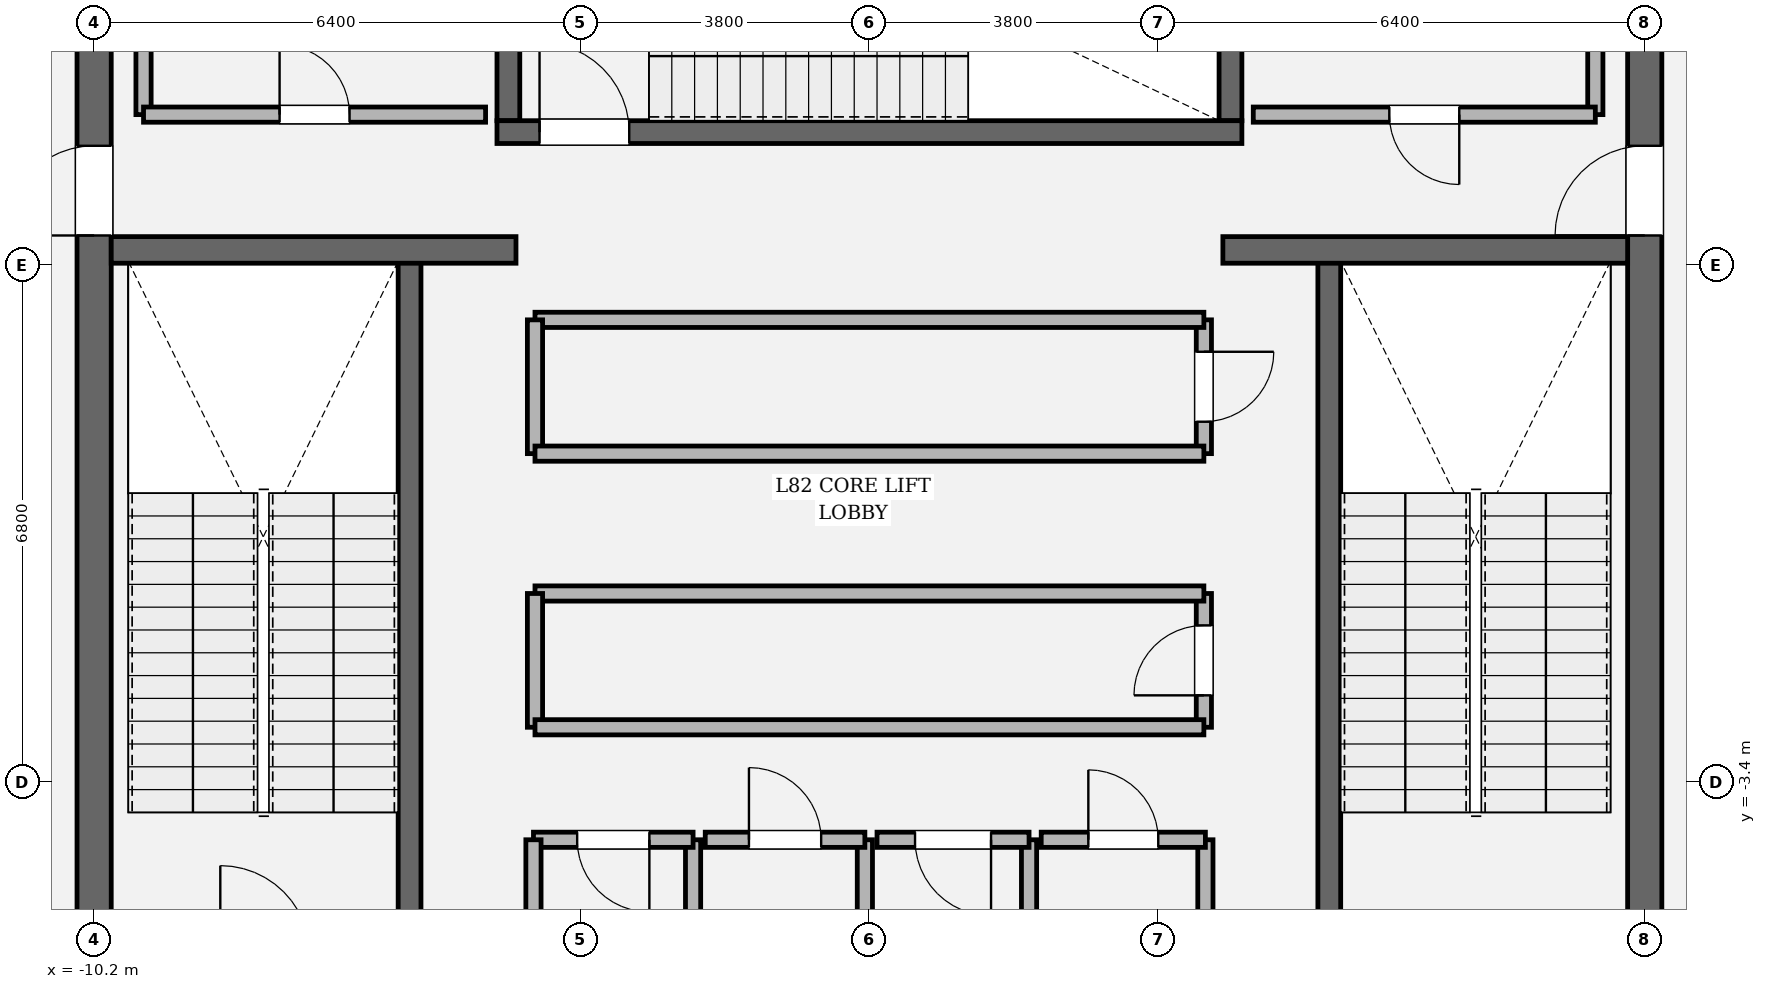
"""IFC4 building model, lengths in metres.
Left out: names, types, materials, properties, quantities, classifications, styles, units other than length and angle.
Written with IfcOpenShell. Run it as: python <this file> out.ifc"""

import sys

from ifc_helpers import new_model, si_unit, direction, frame, frame_2d, origin, place, context, subcontext, project, spatial, rectangle, extrude, element, fill, save


model = new_model("IFC4")
c1 = context("Model", 3, precision=1e-05, world=origin(), true_north=direction((0.0, 1.0)))
c2 = subcontext(c1, "Body", "Model", "MODEL_VIEW")
j1 = project(units=[si_unit("LENGTHUNIT", "METRE"), si_unit("PLANEANGLEUNIT", "RADIAN")], contexts=[c1])
p1 = place(None, origin())
s1 = spatial("IfcSite", under=j1, at=p1, CompositionType="ELEMENT")
p2 = place(p1, origin())
s2 = spatial("IfcBuilding", under=s1, at=p2, CompositionType="ELEMENT")
p3 = place(p2, frame((0.0, 0.0, 348.3)))
s3 = spatial("IfcBuildingStorey", under=s2, at=p3, CompositionType="ELEMENT", Elevation=348.3)
p4 = place(p3, frame((-10.2, -8.975, 0.0), z_axis=(0.0, 0.0, 1.0), x_axis=(0.0, 1.0, 0.0)))
e1 = element("IfcWall", 1, at=p4, inside=s3, PredefinedType="SHEAR", context=c2, shape_type="SweptSolid", body=[
    extrude(rectangle(XDim=17.95, YDim=0.45, at=frame_2d((8.975, 0.0))), origin(), (0.0, 0.0, 1.0), 4.5),
])
p5 = place(p4, frame((12.765, 0.0, 0.0)))
e2 = element("IfcOpeningElement", 2, at=p5, cuts=e1, PredefinedType="OPENING", context=c2, shape_type="SweptSolid", body=[
    extrude(rectangle(XDim=1.18, YDim=2.2, at=frame_2d((0.59, 1.1))), frame((0.0, 0.235, 0.0), z_axis=(0.0, -1.0, 0.0), x_axis=(1.0, 0.0, 0.0)), (0.0, 0.0, 1.0), 0.47),
])
p6 = place(p3, frame((10.2, 8.975, 0.0), z_axis=(0.0, 0.0, 1.0), x_axis=(0.0, -1.0, 0.0)))
e3 = element("IfcWall", 3, at=p6, inside=s3, PredefinedType="SHEAR", context=c2, shape_type="SweptSolid", body=[
    extrude(rectangle(XDim=17.95, YDim=0.45, at=frame_2d((8.975, 0.0))), origin(), (0.0, 0.0, 1.0), 4.5),
])
p7 = place(p6, frame((4.005, 0.0, 0.0)))
e4 = element("IfcOpeningElement", 4, at=p7, cuts=e3, PredefinedType="OPENING", context=c2, shape_type="SweptSolid", body=[
    extrude(rectangle(XDim=1.18, YDim=2.2, at=frame_2d((0.59, 1.1))), frame((0.0, 0.235, 0.0), z_axis=(0.0, -1.0, 0.0), x_axis=(1.0, 0.0, 0.0)), (0.0, 0.0, 1.0), 0.47),
])
for number, where, z_axis, x_axis in (
    (5, (-6.05, -5.5, 0.0), (0.0, 0.0, 1.0), (0.0, 1.0, 0.0)),
    (6, (6.05, 3.45, 0.0), (0.0, 0.0, 1.0), (0.0, -1.0, 0.0)),
):
    element("IfcWall", number, at=place(p3, frame(where, z_axis=z_axis, x_axis=x_axis)), inside=s3, PredefinedType="SOLIDWALL", context=c2, shape_type="SweptSolid", body=[
        extrude(rectangle(XDim=8.95, YDim=0.3, at=frame_2d((4.475, 0.0))), origin(), (0.0, 0.0, 1.0), 4.5),
    ])
for number, where, z_axis, x_axis in (
    (7, (-4.75, 5.3, 0.0), (0.0, 0.0, 1.0), (0.0, 1.0, 0.0)),
    (8, (4.75, 8.975, 0.0), (0.0, 0.0, 1.0), (0.0, -1.0, 0.0)),
):
    element("IfcWall", number, at=place(p3, frame(where, z_axis=z_axis, x_axis=x_axis)), inside=s3, PredefinedType="SOLIDWALL", context=c2, shape_type="SweptSolid", body=[
        extrude(rectangle(XDim=3.675, YDim=0.3, at=frame_2d((1.837, 0.0))), origin(), (0.0, 0.0, 1.0), 4.5),
    ])
p8 = place(p3, frame((-4.9, 5.15, 0.0), z_axis=(0.0, 0.0, 1.0), x_axis=(1.0, 0.0, 0.0)))
e9 = element("IfcWall", 9, at=p8, inside=s3, PredefinedType="SOLIDWALL", context=c2, shape_type="SweptSolid", body=[
    extrude(rectangle(XDim=9.8, YDim=0.3, at=frame_2d((4.9, 0.0))), origin(), (0.0, 0.0, 1.0), 4.5),
])
p9 = place(p8, frame((0.56, 0.0, 0.0)))
e10 = element("IfcOpeningElement", 10, at=p9, cuts=e9, PredefinedType="OPENING", context=c2, shape_type="SweptSolid", body=[
    extrude(rectangle(XDim=1.18, YDim=2.2, at=frame_2d((0.59, 1.1))), frame((0.0, 0.16, 0.0), z_axis=(0.0, -1.0, 0.0), x_axis=(1.0, 0.0, 0.0)), (0.0, 0.0, 1.0), 0.32),
])
for number, where, z_axis, x_axis in (
    (11, (-9.975, 3.6, 0.0), (0.0, 0.0, 1.0), (1.0, 0.0, 0.0)),
    (12, (4.65, 3.6, 0.0), (0.0, 0.0, 1.0), (1.0, 0.0, 0.0)),
):
    element("IfcWall", number, at=place(p3, frame(where, z_axis=z_axis, x_axis=x_axis)), inside=s3, PredefinedType="SOLIDWALL", context=c2, shape_type="SweptSolid", body=[
        extrude(rectangle(XDim=5.325, YDim=0.35, at=frame_2d((2.663, 0.0))), origin(), (0.0, 0.0, 1.0), 4.5),
    ])
p10 = place(p3, frame((-2.32, -5.9, 0.0), z_axis=(0.0, 0.0, 1.0), x_axis=(0.0, 1.0, 0.0)))
e13 = element("IfcWall", 13, at=p10, inside=s3, PredefinedType="SOLIDWALL", context=c2, shape_type="SweptSolid", body=[
    extrude(rectangle(XDim=1.74, YDim=0.2, at=frame_2d((0.87, 0.0))), origin(), (0.0, 0.0, 1.0), 4.22),
])
p11 = place(p3, frame((-2.32, -4.16, 0.0), z_axis=(0.0, 0.0, 1.0), x_axis=(-1.0, 0.0, 0.0)))
e14 = element("IfcWall", 14, at=p11, inside=s3, PredefinedType="SOLIDWALL", context=c2, shape_type="SweptSolid", body=[
    extrude(rectangle(XDim=2.1, YDim=0.2, at=frame_2d((1.05, 0.0))), origin(), (0.0, 0.0, 1.0), 4.22),
])
p12 = place(p11, frame((0.575, 0.0, 0.0)))
e15 = element("IfcOpeningElement", 15, at=p12, cuts=e14, PredefinedType="OPENING", context=c2, shape_type="SweptSolid", body=[
    extrude(rectangle(XDim=0.95, YDim=2.15, at=frame_2d((0.475, 1.075))), frame((0.0, 0.11, 0.0), z_axis=(0.0, -1.0, 0.0), x_axis=(1.0, 0.0, 0.0)), (0.0, 0.0, 1.0), 0.22),
])
for number, where, z_axis, x_axis in (
    (16, (-4.42, -4.16, 0.0), (0.0, 0.0, 1.0), (0.0, -1.0, 0.0)),
    (17, (-0.06, -5.9, 0.0), (0.0, 0.0, 1.0), (0.0, 1.0, 0.0)),
):
    element("IfcWall", number, at=place(p3, frame(where, z_axis=z_axis, x_axis=x_axis)), inside=s3, PredefinedType="SOLIDWALL", context=c2, shape_type="SweptSolid", body=[
        extrude(rectangle(XDim=1.74, YDim=0.2, at=frame_2d((0.87, 0.0))), origin(), (0.0, 0.0, 1.0), 4.22),
    ])
p13 = place(p3, frame((-0.06, -4.16, 0.0), z_axis=(0.0, 0.0, 1.0), x_axis=(-1.0, 0.0, 0.0)))
e18 = element("IfcWall", 18, at=p13, inside=s3, PredefinedType="SOLIDWALL", context=c2, shape_type="SweptSolid", body=[
    extrude(rectangle(XDim=2.1, YDim=0.2, at=frame_2d((1.05, 0.0))), origin(), (0.0, 0.0, 1.0), 4.22),
])
p14 = place(p13, frame((0.575, 0.0, 0.0)))
e19 = element("IfcOpeningElement", 19, at=p14, cuts=e18, PredefinedType="OPENING", context=c2, shape_type="SweptSolid", body=[
    extrude(rectangle(XDim=0.95, YDim=2.15, at=frame_2d((0.475, 1.075))), frame((0.0, 0.11, 0.0), z_axis=(0.0, -1.0, 0.0), x_axis=(1.0, 0.0, 0.0)), (0.0, 0.0, 1.0), 0.22),
])
p15 = place(p3, frame((2.1, -5.9, 0.0), z_axis=(0.0, 0.0, 1.0), x_axis=(0.0, 1.0, 0.0)))
e20 = element("IfcWall", 20, at=p15, inside=s3, PredefinedType="SOLIDWALL", context=c2, shape_type="SweptSolid", body=[
    extrude(rectangle(XDim=1.74, YDim=0.2, at=frame_2d((0.87, 0.0))), origin(), (0.0, 0.0, 1.0), 4.22),
])
p16 = place(p3, frame((2.1, -4.16, 0.0), z_axis=(0.0, 0.0, 1.0), x_axis=(-1.0, 0.0, 0.0)))
e21 = element("IfcWall", 21, at=p16, inside=s3, PredefinedType="SOLIDWALL", context=c2, shape_type="SweptSolid", body=[
    extrude(rectangle(XDim=2.0, YDim=0.2, at=frame_2d((1.0, 0.0))), origin(), (0.0, 0.0, 1.0), 4.22),
])
p17 = place(p16, frame((0.5, 0.0, 0.0)))
e22 = element("IfcOpeningElement", 22, at=p17, cuts=e21, PredefinedType="OPENING", context=c2, shape_type="SweptSolid", body=[
    extrude(rectangle(XDim=1.0, YDim=2.15, at=frame_2d((0.5, 1.075))), frame((0.0, 0.11, 0.0), z_axis=(0.0, -1.0, 0.0), x_axis=(1.0, 0.0, 0.0)), (0.0, 0.0, 1.0), 0.22),
])
p18 = place(p3, frame((4.42, -5.9, 0.0), z_axis=(0.0, 0.0, 1.0), x_axis=(0.0, 1.0, 0.0)))
e23 = element("IfcWall", 23, at=p18, inside=s3, PredefinedType="SOLIDWALL", context=c2, shape_type="SweptSolid", body=[
    extrude(rectangle(XDim=1.74, YDim=0.2, at=frame_2d((0.87, 0.0))), origin(), (0.0, 0.0, 1.0), 4.22),
])
p19 = place(p3, frame((4.42, -4.16, 0.0), z_axis=(0.0, 0.0, 1.0), x_axis=(-1.0, 0.0, 0.0)))
e24 = element("IfcWall", 24, at=p19, inside=s3, PredefinedType="SOLIDWALL", context=c2, shape_type="SweptSolid", body=[
    extrude(rectangle(XDim=2.16, YDim=0.2, at=frame_2d((1.08, 0.0))), origin(), (0.0, 0.0, 1.0), 4.22),
])
p20 = place(p19, frame((0.62, 0.0, 0.0)))
e25 = element("IfcOpeningElement", 25, at=p20, cuts=e24, PredefinedType="OPENING", context=c2, shape_type="SweptSolid", body=[
    extrude(rectangle(XDim=0.92, YDim=2.1, at=frame_2d((0.46, 1.05))), frame((0.0, 0.11, 0.0), z_axis=(0.0, -1.0, 0.0), x_axis=(1.0, 0.0, 0.0)), (0.0, 0.0, 1.0), 0.22),
])
p21 = place(p3, frame((4.4, -2.68, 0.0), z_axis=(0.0, 0.0, 1.0), x_axis=(0.0, 1.0, 0.0)))
e26 = element("IfcWall", 26, at=p21, inside=s3, PredefinedType="SOLIDWALL", context=c2, shape_type="SweptSolid", body=[
    extrude(rectangle(XDim=1.76, YDim=0.2, at=frame_2d((0.88, 0.0))), origin(), (0.0, 0.0, 1.0), 4.22),
])
p22 = place(p21, frame((0.42, 0.0, 0.0)))
e27 = element("IfcOpeningElement", 27, at=p22, cuts=e26, PredefinedType="OPENING", context=c2, shape_type="SweptSolid", body=[
    extrude(rectangle(XDim=0.92, YDim=2.1, at=frame_2d((0.46, 1.05))), frame((0.0, 0.11, 0.0), z_axis=(0.0, -1.0, 0.0), x_axis=(1.0, 0.0, 0.0)), (0.0, 0.0, 1.0), 0.22),
])
p23 = place(p3, frame((4.4, -0.92, 0.0), z_axis=(0.0, 0.0, 1.0), x_axis=(-1.0, 0.0, 0.0)))
e28 = element("IfcWall", 28, at=p23, inside=s3, PredefinedType="SOLIDWALL", context=c2, shape_type="SweptSolid", body=[
    extrude(rectangle(XDim=8.8, YDim=0.2, at=frame_2d((4.4, 0.0))), origin(), (0.0, 0.0, 1.0), 4.22),
])
p24 = place(p3, frame((-4.4, -0.92, 0.0), z_axis=(0.0, 0.0, 1.0), x_axis=(0.0, -1.0, 0.0)))
e29 = element("IfcWall", 29, at=p24, inside=s3, PredefinedType="SOLIDWALL", context=c2, shape_type="SweptSolid", body=[
    extrude(rectangle(XDim=1.76, YDim=0.2, at=frame_2d((0.88, 0.0))), origin(), (0.0, 0.0, 1.0), 4.22),
])
p25 = place(p3, frame((-4.4, -2.68, 0.0), z_axis=(0.0, 0.0, 1.0), x_axis=(1.0, 0.0, 0.0)))
e30 = element("IfcWall", 30, at=p25, inside=s3, PredefinedType="SOLIDWALL", context=c2, shape_type="SweptSolid", body=[
    extrude(rectangle(XDim=8.8, YDim=0.2, at=frame_2d((4.4, 0.0))), origin(), (0.0, 0.0, 1.0), 4.22),
])
p26 = place(p3, frame((4.4, 0.92, 0.0), z_axis=(0.0, 0.0, 1.0), x_axis=(0.0, 1.0, 0.0)))
e31 = element("IfcWall", 31, at=p26, inside=s3, PredefinedType="SOLIDWALL", context=c2, shape_type="SweptSolid", body=[
    extrude(rectangle(XDim=1.76, YDim=0.2, at=frame_2d((0.88, 0.0))), origin(), (0.0, 0.0, 1.0), 4.22),
])
p27 = place(p26, frame((0.42, 0.0, 0.0)))
e32 = element("IfcOpeningElement", 32, at=p27, cuts=e31, PredefinedType="OPENING", context=c2, shape_type="SweptSolid", body=[
    extrude(rectangle(XDim=0.92, YDim=2.1, at=frame_2d((0.46, 1.05))), frame((0.0, 0.11, 0.0), z_axis=(0.0, -1.0, 0.0), x_axis=(1.0, 0.0, 0.0)), (0.0, 0.0, 1.0), 0.22),
])
p28 = place(p3, frame((4.4, 2.68, 0.0), z_axis=(0.0, 0.0, 1.0), x_axis=(-1.0, 0.0, 0.0)))
e33 = element("IfcWall", 33, at=p28, inside=s3, PredefinedType="SOLIDWALL", context=c2, shape_type="SweptSolid", body=[
    extrude(rectangle(XDim=8.8, YDim=0.2, at=frame_2d((4.4, 0.0))), origin(), (0.0, 0.0, 1.0), 4.22),
])
p29 = place(p3, frame((-4.4, 2.68, 0.0), z_axis=(0.0, 0.0, 1.0), x_axis=(0.0, -1.0, 0.0)))
e34 = element("IfcWall", 34, at=p29, inside=s3, PredefinedType="SOLIDWALL", context=c2, shape_type="SweptSolid", body=[
    extrude(rectangle(XDim=1.76, YDim=0.2, at=frame_2d((0.88, 0.0))), origin(), (0.0, 0.0, 1.0), 4.22),
])
p30 = place(p3, frame((-4.4, 0.92, 0.0), z_axis=(0.0, 0.0, 1.0), x_axis=(1.0, 0.0, 0.0)))
e35 = element("IfcWall", 35, at=p30, inside=s3, PredefinedType="SOLIDWALL", context=c2, shape_type="SweptSolid", body=[
    extrude(rectangle(XDim=8.8, YDim=0.2, at=frame_2d((4.4, 0.0))), origin(), (0.0, 0.0, 1.0), 4.22),
])
p31 = place(p3, frame((-9.55, 8.65, 0.0), z_axis=(0.0, 0.0, 1.0), x_axis=(0.0, -1.0, 0.0)))
e36 = element("IfcWall", 36, at=p31, inside=s3, PredefinedType="SOLIDWALL", context=c2, shape_type="SweptSolid", body=[
    extrude(rectangle(XDim=3.27, YDim=0.2, at=frame_2d((1.635, 0.0))), origin(), (0.0, 0.0, 1.0), 4.22),
])
p32 = place(p3, frame((-9.55, 5.38, 0.0), z_axis=(0.0, 0.0, 1.0), x_axis=(1.0, 0.0, 0.0)))
e37 = element("IfcWall", 37, at=p32, inside=s3, PredefinedType="SOLIDWALL", context=c2, shape_type="SweptSolid", body=[
    extrude(rectangle(XDim=4.5, YDim=0.2, at=frame_2d((2.25, 0.0))), origin(), (0.0, 0.0, 1.0), 4.22),
])
p33 = place(p32, frame((1.79, 0.0, 0.0)))
e38 = element("IfcOpeningElement", 38, at=p33, cuts=e37, PredefinedType="OPENING", context=c2, shape_type="SweptSolid", body=[
    extrude(rectangle(XDim=0.92, YDim=2.1, at=frame_2d((0.46, 1.05))), frame((0.0, 0.11, 0.0), z_axis=(0.0, -1.0, 0.0), x_axis=(1.0, 0.0, 0.0)), (0.0, 0.0, 1.0), 0.22),
])
p34 = place(p3, frame((9.55, 5.38, 0.0), z_axis=(0.0, 0.0, 1.0), x_axis=(0.0, 1.0, 0.0)))
e39 = element("IfcWall", 39, at=p34, inside=s3, PredefinedType="SOLIDWALL", context=c2, shape_type="SweptSolid", body=[
    extrude(rectangle(XDim=3.27, YDim=0.2, at=frame_2d((1.635, 0.0))), origin(), (0.0, 0.0, 1.0), 4.22),
])
p35 = place(p3, frame((5.05, 5.38, 0.0), z_axis=(0.0, 0.0, 1.0), x_axis=(1.0, 0.0, 0.0)))
e40 = element("IfcWall", 40, at=p35, inside=s3, PredefinedType="SOLIDWALL", context=c2, shape_type="SweptSolid", body=[
    extrude(rectangle(XDim=4.5, YDim=0.2, at=frame_2d((2.25, 0.0))), origin(), (0.0, 0.0, 1.0), 4.22),
])
p36 = place(p35, frame((1.79, 0.0, 0.0)))
e41 = element("IfcOpeningElement", 41, at=p36, cuts=e40, PredefinedType="OPENING", context=c2, shape_type="SweptSolid", body=[
    extrude(rectangle(XDim=0.92, YDim=2.1, at=frame_2d((0.46, 1.05))), frame((0.0, 0.11, 0.0), z_axis=(0.0, -1.0, 0.0), x_axis=(1.0, 0.0, 0.0)), (0.0, 0.0, 1.0), 0.22),
])
p37 = place(p9, origin())
e42 = element("IfcDoor", 42, at=p37, inside=s3, OperationType="SINGLE_SWING_LEFT", PredefinedType="DOOR", context=c2, shape_type="SweptSolid", body=[
    extrude(rectangle(XDim=1.18, YDim=2.2, at=frame_2d((0.59, 1.1))), frame((0.0, 0.025, 0.0), z_axis=(0.0, -1.0, 0.0), x_axis=(1.0, 0.0, 0.0)), (0.0, 0.0, 1.0), 0.05),
])
fill(e10, e42)
p38 = place(p5, origin())
e43 = element("IfcDoor", 43, at=p38, inside=s3, OperationType="SINGLE_SWING_LEFT", PredefinedType="DOOR", context=c2, shape_type="SweptSolid", body=[
    extrude(rectangle(XDim=1.18, YDim=2.2, at=frame_2d((0.59, 1.1))), frame((0.0, 0.025, 0.0), z_axis=(0.0, -1.0, 0.0), x_axis=(1.0, 0.0, 0.0)), (0.0, 0.0, 1.0), 0.05),
])
fill(e2, e43)
p39 = place(p7, origin())
e44 = element("IfcDoor", 44, at=p39, inside=s3, OperationType="SINGLE_SWING_RIGHT", PredefinedType="DOOR", context=c2, shape_type="SweptSolid", body=[
    extrude(rectangle(XDim=1.18, YDim=2.2, at=frame_2d((0.59, 1.1))), frame((0.0, 0.025, 0.0), z_axis=(0.0, -1.0, 0.0), x_axis=(1.0, 0.0, 0.0)), (0.0, 0.0, 1.0), 0.05),
])
fill(e4, e44)
p40 = place(p12, origin())
e45 = element("IfcDoor", 45, at=p40, inside=s3, OperationType="SINGLE_SWING_LEFT", PredefinedType="DOOR", context=c2, shape_type="SweptSolid", body=[
    extrude(rectangle(XDim=0.95, YDim=2.15, at=frame_2d((0.475, 1.075))), frame((0.0, 0.025, 0.0), z_axis=(0.0, -1.0, 0.0), x_axis=(1.0, 0.0, 0.0)), (0.0, 0.0, 1.0), 0.05),
])
fill(e15, e45)
p41 = place(p14, origin())
e46 = element("IfcDoor", 46, at=p41, inside=s3, OperationType="SINGLE_SWING_RIGHT", PredefinedType="DOOR", context=c2, shape_type="SweptSolid", body=[
    extrude(rectangle(XDim=0.95, YDim=2.15, at=frame_2d((0.475, 1.075))), frame((0.0, 0.025, 0.0), z_axis=(0.0, -1.0, 0.0), x_axis=(1.0, 0.0, 0.0)), (0.0, 0.0, 1.0), 0.05),
])
fill(e19, e46)
p42 = place(p17, origin())
e47 = element("IfcDoor", 47, at=p42, inside=s3, OperationType="SINGLE_SWING_LEFT", PredefinedType="DOOR", context=c2, shape_type="SweptSolid", body=[
    extrude(rectangle(XDim=1.0, YDim=2.15, at=frame_2d((0.5, 1.075))), frame((0.0, 0.025, 0.0), z_axis=(0.0, -1.0, 0.0), x_axis=(1.0, 0.0, 0.0)), (0.0, 0.0, 1.0), 0.05),
])
fill(e22, e47)
p43 = place(p20, origin())
e48 = element("IfcDoor", 48, at=p43, inside=s3, OperationType="SINGLE_SWING_RIGHT", PredefinedType="DOOR", context=c2, shape_type="SweptSolid", body=[
    extrude(rectangle(XDim=0.92, YDim=2.1, at=frame_2d((0.46, 1.05))), frame((0.0, 0.025, 0.0), z_axis=(0.0, -1.0, 0.0), x_axis=(1.0, 0.0, 0.0)), (0.0, 0.0, 1.0), 0.05),
])
fill(e25, e48)
p44 = place(p22, origin())
e49 = element("IfcDoor", 49, at=p44, inside=s3, OperationType="SINGLE_SWING_LEFT", PredefinedType="DOOR", context=c2, shape_type="SweptSolid", body=[
    extrude(rectangle(XDim=0.92, YDim=2.1, at=frame_2d((0.46, 1.05))), frame((0.0, 0.025, 0.0), z_axis=(0.0, -1.0, 0.0), x_axis=(1.0, 0.0, 0.0)), (0.0, 0.0, 1.0), 0.05),
])
fill(e27, e49)
p45 = place(p27, origin())
e50 = element("IfcDoor", 50, at=p45, inside=s3, OperationType="SINGLE_SWING_RIGHT", PredefinedType="DOOR", context=c2, shape_type="SweptSolid", body=[
    extrude(rectangle(XDim=0.92, YDim=2.1, at=frame_2d((0.46, 1.05))), frame((0.0, 0.025, 0.0), z_axis=(0.0, -1.0, 0.0), x_axis=(1.0, 0.0, 0.0)), (0.0, 0.0, 1.0), 0.05),
])
fill(e32, e50)
p46 = place(p33, origin())
e51 = element("IfcDoor", 51, at=p46, inside=s3, OperationType="SINGLE_SWING_LEFT", PredefinedType="DOOR", context=c2, shape_type="SweptSolid", body=[
    extrude(rectangle(XDim=0.92, YDim=2.1, at=frame_2d((0.46, 1.05))), frame((0.0, 0.025, 0.0), z_axis=(0.0, -1.0, 0.0), x_axis=(1.0, 0.0, 0.0)), (0.0, 0.0, 1.0), 0.05),
])
fill(e38, e51)
p47 = place(p36, origin())
e52 = element("IfcDoor", 52, at=p47, inside=s3, OperationType="SINGLE_SWING_RIGHT", PredefinedType="DOOR", context=c2, shape_type="SweptSolid", body=[
    extrude(rectangle(XDim=0.92, YDim=2.1, at=frame_2d((0.46, 1.05))), frame((0.0, 0.025, 0.0), z_axis=(0.0, -1.0, 0.0), x_axis=(1.0, 0.0, 0.0)), (0.0, 0.0, 1.0), 0.05),
])
fill(e41, e52)
save(model, sys.argv[1])
